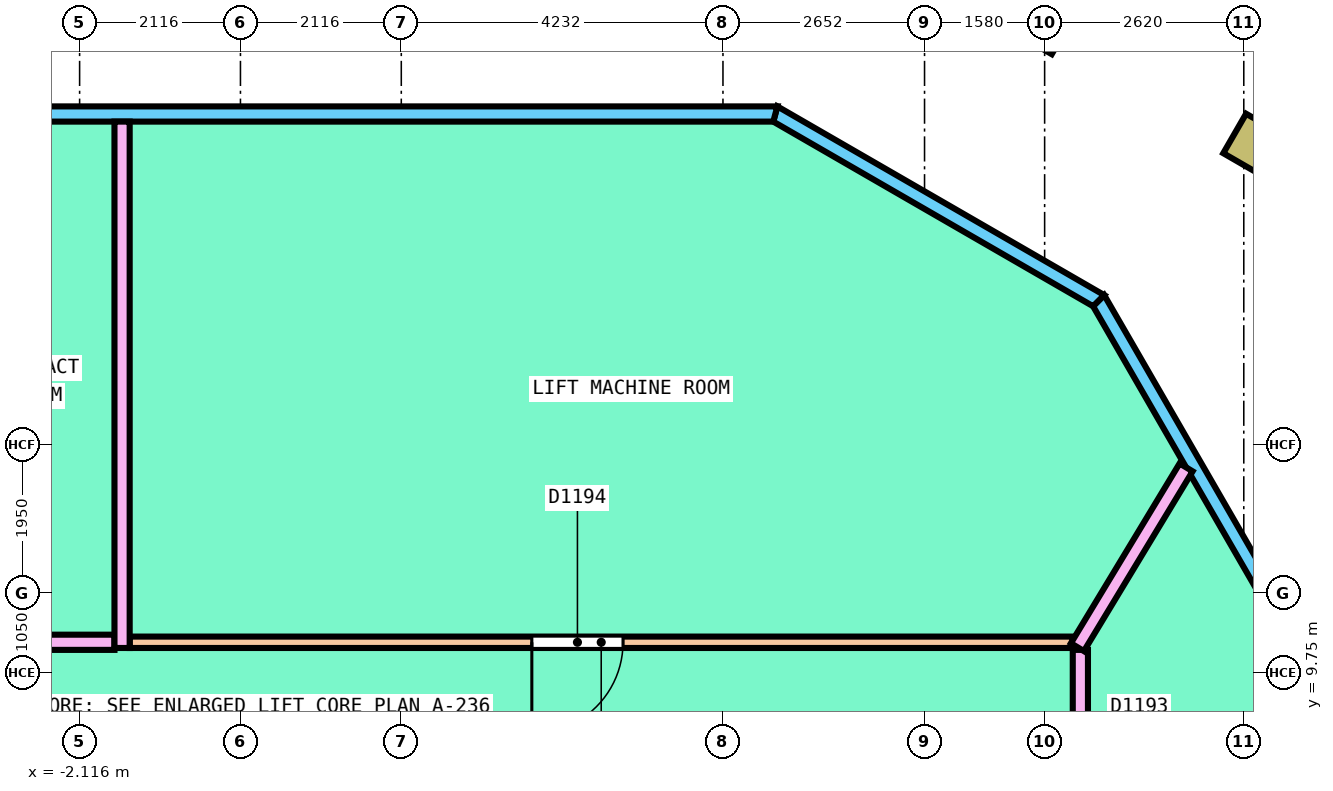
"""IFC4 building model, lengths in metres.
Left out: names, types, materials, properties, quantities, classifications, styles, units other than length and angle.
Written with IfcOpenShell. Run it as: python <this file> out.ifc"""

import sys

from ifc_helpers import new_model, si_unit, direction, frame, frame_2d, origin, origin_2d, place, context, subcontext, project, spatial, polyline, rectangle, hollow_rectangle, outline, extrude, element, fill, save


model = new_model("IFC4")
c1 = context("Model", 3, precision=1e-05, world=origin(), true_north=direction((0.0, 1.0)))
c2 = subcontext(c1, "Body", "Model", "MODEL_VIEW")
j1 = project(units=[si_unit("LENGTHUNIT", "METRE"), si_unit("PLANEANGLEUNIT", "RADIAN")], contexts=[c1])
p1 = place(None, origin())
s1 = spatial("IfcSite", under=j1, at=p1, CompositionType="ELEMENT")
p2 = place(p1, origin())
s2 = spatial("IfcBuilding", under=s1, at=p2, CompositionType="ELEMENT")
p3 = place(p2, frame((0.0, 0.0, 356.6)))
s3 = spatial("IfcBuildingStorey", under=s2, at=p3, CompositionType="ELEMENT", Elevation=356.6)
p4 = place(p3, frame((13.34, 16.694, 0.0), z_axis=(0.0, 0.0, 1.0), x_axis=(-0.866025403784, 0.5, 0.0)))
e1 = element("IfcColumn", 1, at=p4, inside=s3, PredefinedType="COLUMN", context=c2, shape_type="SweptSolid", body=[
    extrude(hollow_rectangle(XDim=0.6, YDim=0.6, WallThickness=0.04, InnerFilletRadius=0.04, OuterFilletRadius=0.08, at=origin_2d()), origin(), (0.0, 0.0, 1.0), 4.0),
])
p5 = place(p3, frame((18.327, 2.456, 0.0), z_axis=(0.0, 0.0, 1.0), x_axis=(-0.499991740577, 0.866030172312, 0.0)))
e2 = element("IfcWall", 2, at=p5, inside=s3, PredefinedType="SOLIDWALL", context=c2, shape_type="SweptSolid", body=[
    extrude(outline(polyline([(-0.027, -0.1), (14.101, -0.1), (14.047, 0.1), (0.027, 0.1), (-0.027, -0.1)])), origin(), (0.0, 0.0, 1.0), 3.8),
])
p6 = place(p3, frame((11.291, 14.644, 0.0), z_axis=(0.0, 0.0, 1.0), x_axis=(-0.86601671623, 0.500015046984, 0.0)))
e3 = element("IfcWall", 3, at=p6, inside=s3, PredefinedType="SOLIDWALL", context=c2, shape_type="SweptSolid", body=[
    extrude(outline(polyline([(-0.027, -0.1), (4.938, -0.1), (4.885, 0.1), (0.027, 0.1), (-0.027, -0.1)])), origin(), (0.0, 0.0, 1.0), 3.8),
])
p7 = place(p3, frame((7.037, 17.1, 0.0), z_axis=(0.0, 0.0, 1.0), x_axis=(-1.0, 0.0, 0.0)))
e4 = element("IfcWall", 4, at=p7, inside=s3, PredefinedType="SOLIDWALL", context=c2, shape_type="SweptSolid", body=[
    extrude(outline(polyline([(-0.027, -0.1), (14.101, -0.1), (14.047, 0.1), (0.027, 0.1), (-0.027, -0.1)])), origin(), (0.0, 0.0, 1.0), 3.8),
])
p8 = place(p3, frame((-1.458, 10.15, 0.0), z_axis=(0.0, 0.0, 1.0), x_axis=(1.0, 0.0, 0.0)))
e5 = element("IfcWall", 5, at=p8, inside=s3, PredefinedType="PARTITIONING", context=c2, shape_type="SweptSolid", body=[
    extrude(rectangle(XDim=12.407, YDim=0.15, at=frame_2d((6.204, 0.0))), origin(), (0.0, 0.0, 1.0), 3.3),
])
p9 = place(p8, frame((5.291, 0.0, 0.0)))
e6 = element("IfcOpeningElement", 6, at=p9, cuts=e5, PredefinedType="OPENING", context=c2, shape_type="SweptSolid", body=[
    extrude(rectangle(XDim=1.2, YDim=2.1, at=frame_2d((0.6, 1.05))), frame((0.0, 0.085, 0.0), z_axis=(0.0, -1.0, 0.0), x_axis=(1.0, 0.0, 0.0)), (0.0, 0.0, 1.0), 0.17),
])
p10 = place(p3, frame((11.05, 4.654, 0.0), z_axis=(0.0, 0.0, 1.0), x_axis=(0.0, 1.0, 0.0)))
e7 = element("IfcWall", 7, at=p10, inside=s3, PredefinedType="PARTITIONING", context=c2, shape_type="SweptSolid", body=[
    extrude(rectangle(XDim=5.396, YDim=0.2, at=frame_2d((2.698, 0.0))), origin(), (0.0, 0.0, 1.0), 3.3),
])
p11 = place(p10, frame((3.367, 0.0, 0.0)))
e8 = element("IfcOpeningElement", 8, at=p11, cuts=e7, PredefinedType="OPENING", context=c2, shape_type="SweptSolid", body=[
    extrude(rectangle(XDim=1.0, YDim=2.1, at=frame_2d((0.5, 1.05))), frame((0.0, 0.11, 0.0), z_axis=(0.0, -1.0, 0.0), x_axis=(1.0, 0.0, 0.0)), (0.0, 0.0, 1.0), 0.22),
])
p12 = place(p3, frame((-6.964, 10.15, 0.0), z_axis=(0.0, 0.0, 1.0), x_axis=(1.0, 0.0, 0.0)))
e9 = element("IfcWall", 9, at=p12, inside=s3, PredefinedType="PARTITIONING", context=c2, shape_type="SweptSolid", body=[
    extrude(rectangle(XDim=5.306, YDim=0.2, at=frame_2d((2.653, 0.0))), origin(), (0.0, 0.0, 1.0), 3.3),
])
p13 = place(p12, frame((2.995, 0.0, 0.0)))
e10 = element("IfcOpeningElement", 10, at=p13, cuts=e9, PredefinedType="OPENING", context=c2, shape_type="SweptSolid", body=[
    extrude(rectangle(XDim=1.0, YDim=2.1, at=frame_2d((0.5, 1.05))), frame((0.0, 0.11, 0.0), z_axis=(0.0, -1.0, 0.0), x_axis=(1.0, 0.0, 0.0)), (0.0, 0.0, 1.0), 0.22),
])
p14 = place(p12, frame((0.492, 0.0, 0.0)))
e11 = element("IfcOpeningElement", 11, at=p14, cuts=e9, PredefinedType="OPENING", context=c2, shape_type="SweptSolid", body=[
    extrude(rectangle(XDim=1.0, YDim=2.1, at=frame_2d((0.5, 1.05))), frame((0.0, 0.11, 0.0), z_axis=(0.0, -1.0, 0.0), x_axis=(1.0, 0.0, 0.0)), (0.0, 0.0, 1.0), 0.22),
])
p15 = place(p3, frame((11.011, 10.086, 0.0), z_axis=(0.0, 0.0, 1.0), x_axis=(0.517428364129, 0.855726526406, 0.0)))
e12 = element("IfcWall", 12, at=p15, inside=s3, PredefinedType="PARTITIONING", context=c2, shape_type="SweptSolid", body=[
    extrude(rectangle(XDim=2.764, YDim=0.2, at=frame_2d((1.382, 0.0))), origin(), (0.0, 0.0, 1.0), 3.3),
])
p16 = place(p3, frame((-1.557, 10.075, 0.0), z_axis=(0.0, 0.0, 1.0), x_axis=(0.0, 1.0, 0.0)))
e13 = element("IfcWall", 13, at=p16, inside=s3, PredefinedType="PARTITIONING", context=c2, shape_type="SweptSolid", body=[
    extrude(rectangle(XDim=6.925, YDim=0.2, at=frame_2d((3.462, 0.0))), origin(), (0.0, 0.0, 1.0), 3.3),
])
p17 = place(p9, origin())
e14 = element("IfcDoor", 14, at=p17, inside=s3, OperationType="DOUBLE_DOOR_SINGLE_SWING", PredefinedType="DOOR", context=c2, shape_type="SweptSolid", body=[
    extrude(rectangle(XDim=1.2, YDim=2.1, at=frame_2d((0.6, 1.05))), frame((0.0, 0.025, 0.0), z_axis=(0.0, -1.0, 0.0), x_axis=(1.0, 0.0, 0.0)), (0.0, 0.0, 1.0), 0.05),
])
fill(e6, e14)
save(model, sys.argv[1])
